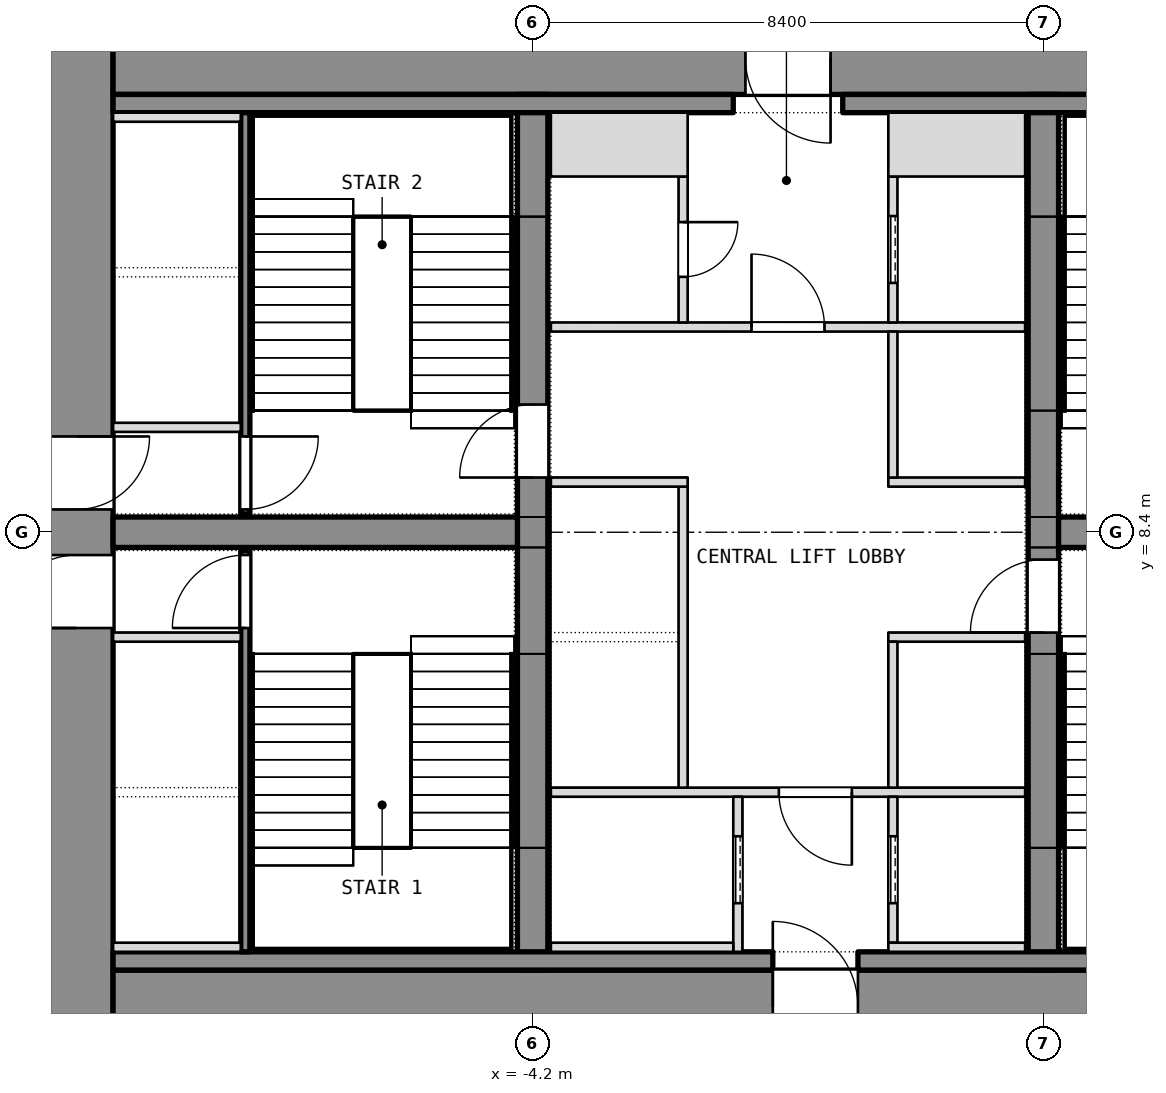
"""IFC4 building model, lengths in metres.
Left out: names, types, materials, properties, quantities, classifications, styles, units other than length and angle.
Written with IfcOpenShell. Run it as: python <this file> out.ifc"""

import sys

from ifc_helpers import new_model, si_unit, direction, frame, frame_2d, origin, place, context, subcontext, project, spatial, rectangle, extrude, element, fill, save


model = new_model("IFC4")
c1 = context("Model", 3, precision=1e-05, world=origin(), true_north=direction((0.0, 1.0)))
c2 = subcontext(c1, "Body", "Model", "MODEL_VIEW")
j1 = project(units=[si_unit("LENGTHUNIT", "METRE"), si_unit("PLANEANGLEUNIT", "RADIAN")], contexts=[c1])
p1 = place(None, origin())
s1 = spatial("IfcSite", under=j1, at=p1, CompositionType="ELEMENT")
p2 = place(p1, origin())
s2 = spatial("IfcBuilding", under=s1, at=p2, CompositionType="ELEMENT")
p3 = place(p2, frame((0.0, 0.0, 86.9)))
s3 = spatial("IfcBuildingStorey", under=s2, at=p3, CompositionType="ELEMENT", Elevation=86.9)
p4 = place(p3, frame((-11.7, 0.0, 0.0), z_axis=(0.0, 0.0, 1.0), x_axis=(0.0, 1.0, 0.0)))
e1 = element("IfcWall", 1, at=p4, inside=s3, PredefinedType="SHEAR", context=c2, shape_type="SweptSolid", body=[
    extrude(rectangle(XDim=16.8, YDim=1.2, at=frame_2d((8.4, 0.0))), origin(), (0.0, 0.0, 1.0), 10.8),
])
p5 = place(p4, frame((6.825, 0.0, 0.0)))
e2 = element("IfcOpeningElement", 2, at=p5, cuts=e1, PredefinedType="OPENING", context=c2, shape_type="SweptSolid", body=[
    extrude(rectangle(XDim=1.2, YDim=2.1, at=frame_2d((0.6, 1.05))), frame((0.0, 0.6, 0.0), z_axis=(0.0, -1.0, 0.0), x_axis=(1.0, 0.0, 0.0)), (0.0, 0.0, 1.0), 1.2),
])
p6 = place(p4, frame((8.775, 0.0, 0.0)))
e3 = element("IfcOpeningElement", 3, at=p6, cuts=e1, PredefinedType="OPENING", context=c2, shape_type="SweptSolid", body=[
    extrude(rectangle(XDim=1.2, YDim=2.1, at=frame_2d((0.6, 1.05))), frame((0.0, 0.6, 0.0), z_axis=(0.0, -1.0, 0.0), x_axis=(1.0, 0.0, 0.0)), (0.0, 0.0, 1.0), 1.2),
])
p7 = place(p3, frame((-11.1, 0.6, 0.0), z_axis=(0.0, 0.0, 1.0), x_axis=(1.0, 0.0, 0.0)))
e4 = element("IfcWall", 4, at=p7, inside=s3, PredefinedType="SHEAR", context=c2, shape_type="SweptSolid", body=[
    extrude(rectangle(XDim=22.2, YDim=1.2, at=frame_2d((11.1, 0.0))), origin(), (0.0, 0.0, 1.0), 10.8),
])
p8 = place(p7, frame((10.85, 0.0, 0.0)))
e5 = element("IfcOpeningElement", 5, at=p8, cuts=e4, PredefinedType="OPENING", context=c2, shape_type="SweptSolid", body=[
    extrude(rectangle(XDim=1.4, YDim=2.1, at=frame_2d((0.7, 1.05))), frame((0.0, 0.6, 0.0), z_axis=(0.0, -1.0, 0.0), x_axis=(1.0, 0.0, 0.0)), (0.0, 0.0, 1.0), 1.2),
])
p9 = place(p3, frame((-11.1, 16.2, 0.0), z_axis=(0.0, 0.0, 1.0), x_axis=(1.0, 0.0, 0.0)))
e6 = element("IfcWall", 6, at=p9, inside=s3, PredefinedType="SHEAR", context=c2, shape_type="SweptSolid", body=[
    extrude(rectangle(XDim=22.2, YDim=1.2, at=frame_2d((11.1, 0.0))), origin(), (0.0, 0.0, 1.0), 10.8),
])
p10 = place(p9, frame((10.4, 0.0, 0.0)))
e7 = element("IfcOpeningElement", 7, at=p10, cuts=e6, PredefinedType="OPENING", context=c2, shape_type="SweptSolid", body=[
    extrude(rectangle(XDim=1.4, YDim=2.1, at=frame_2d((0.7, 1.05))), frame((0.0, 0.6, 0.0), z_axis=(0.0, -1.0, 0.0), x_axis=(1.0, 0.0, 0.0)), (0.0, 0.0, 1.0), 1.2),
])
p11 = place(p3, frame((-4.2, 1.2, 0.0), z_axis=(0.0, 0.0, 1.0), x_axis=(0.0, 1.0, 0.0)))
e8 = element("IfcWall", 8, at=p11, inside=s3, PredefinedType="SHEAR", context=c2, shape_type="SweptSolid", body=[
    extrude(rectangle(XDim=14.4, YDim=0.5, at=frame_2d((7.2, 0.0))), origin(), (0.0, 0.0, 1.0), 10.8),
])
p12 = place(p11, frame((8.1, 0.0, 0.0)))
e9 = element("IfcOpeningElement", 9, at=p12, cuts=e8, PredefinedType="OPENING", context=c2, shape_type="SweptSolid", body=[
    extrude(rectangle(XDim=1.2, YDim=2.1, at=frame_2d((0.6, 1.05))), frame((0.0, 0.25, 0.0), z_axis=(0.0, -1.0, 0.0), x_axis=(1.0, 0.0, 0.0)), (0.0, 0.0, 1.0), 0.5),
])
p13 = place(p3, frame((4.2, 1.2, 0.0), z_axis=(0.0, 0.0, 1.0), x_axis=(0.0, 1.0, 0.0)))
e10 = element("IfcWall", 10, at=p13, inside=s3, PredefinedType="SHEAR", context=c2, shape_type="SweptSolid", body=[
    extrude(rectangle(XDim=14.4, YDim=0.5, at=frame_2d((7.2, 0.0))), origin(), (0.0, 0.0, 1.0), 10.8),
])
p14 = place(p13, frame((5.55, 0.0, 0.0)))
e11 = element("IfcOpeningElement", 11, at=p14, cuts=e10, PredefinedType="OPENING", context=c2, shape_type="SweptSolid", body=[
    extrude(rectangle(XDim=1.2, YDim=2.1, at=frame_2d((0.6, 1.05))), frame((0.0, 0.25, 0.0), z_axis=(0.0, -1.0, 0.0), x_axis=(1.0, 0.0, 0.0)), (0.0, 0.0, 1.0), 0.5),
])
for number, where, z_axis, x_axis in (
    (12, (-11.1, 8.4, 0.0), (0.0, 0.0, 1.0), (1.0, 0.0, 0.0)),
    (13, (4.45, 8.4, 0.0), (0.0, 0.0, 1.0), (1.0, 0.0, 0.0)),
):
    element("IfcWall", number, at=place(p3, frame(where, z_axis=z_axis, x_axis=x_axis)), inside=s3, PredefinedType="SHEAR", context=c2, shape_type="SweptSolid", body=[
        extrude(rectangle(XDim=6.65, YDim=0.5, at=frame_2d((3.325, 0.0))), origin(), (0.0, 0.0, 1.0), 10.8),
    ])
p15 = place(p3, frame((-11.1, 1.35, 0.0), z_axis=(0.0, 0.0, 1.0), x_axis=(1.0, 0.0, 0.0)))
e14 = element("IfcWall", 14, at=p15, inside=s3, PredefinedType="PARTITIONING", context=c2, shape_type="SweptSolid", body=[
    extrude(rectangle(XDim=10.85, YDim=0.3, at=frame_2d((5.425, 0.0))), origin(), (0.0, 0.0, 1.0), 10.54),
])
p16 = place(p3, frame((1.15, 1.35, 0.0), z_axis=(0.0, 0.0, 1.0), x_axis=(1.0, 0.0, 0.0)))
e15 = element("IfcWall", 15, at=p16, inside=s3, PredefinedType="PARTITIONING", context=c2, shape_type="SweptSolid", body=[
    extrude(rectangle(XDim=9.95, YDim=0.3, at=frame_2d((4.975, 0.0))), origin(), (0.0, 0.0, 1.0), 10.54),
])
for number, where, z_axis, x_axis in (
    (16, (-11.1, 15.45, 0.0), (0.0, 0.0, 1.0), (1.0, 0.0, 0.0)),
    (17, (0.9, 15.45, 0.0), (0.0, 0.0, 1.0), (1.0, 0.0, 0.0)),
):
    element("IfcWall", number, at=place(p3, frame(where, z_axis=z_axis, x_axis=x_axis)), inside=s3, PredefinedType="PARTITIONING", context=c2, shape_type="SweptSolid", body=[
        extrude(rectangle(XDim=10.2, YDim=0.3, at=frame_2d((5.1, 0.0))), origin(), (0.0, 0.0, 1.0), 10.54),
    ])
p17 = place(p3, frame((-8.925, 1.5, 0.0), z_axis=(0.0, 0.0, 1.0), x_axis=(0.0, 1.0, 0.0)))
e18 = element("IfcWall", 18, at=p17, inside=s3, PredefinedType="SHEAR", context=c2, shape_type="SweptSolid", body=[
    extrude(rectangle(XDim=6.6, YDim=0.15, at=frame_2d((3.3, 0.0))), origin(), (0.0, 0.0, 1.0), 10.54),
])
p18 = place(p17, frame((5.325, 0.0, 0.0)))
e19 = element("IfcOpeningElement", 19, at=p18, cuts=e18, PredefinedType="OPENING", context=c2, shape_type="SweptSolid", body=[
    extrude(rectangle(XDim=1.2, YDim=2.1, at=frame_2d((0.6, 1.05))), frame((0.0, 0.075, 0.0), z_axis=(0.0, -1.0, 0.0), x_axis=(1.0, 0.0, 0.0)), (0.0, 0.0, 1.0), 0.15),
])
for number, where, z_axis, x_axis in (
    (20, (-11.1, 6.675, 0.0), (0.0, 0.0, 1.0), (1.0, 0.0, 0.0)),
    (21, (-11.1, 1.575, 0.0), (0.0, 0.0, 1.0), (1.0, 0.0, 0.0)),
):
    element("IfcWall", number, at=place(p3, frame(where, z_axis=z_axis, x_axis=x_axis)), inside=s3, PredefinedType="SHEAR", context=c2, shape_type="SweptSolid", body=[
        extrude(rectangle(XDim=2.1, YDim=0.15, at=frame_2d((1.05, 0.0))), origin(), (0.0, 0.0, 1.0), 10.8),
    ])
p19 = place(p3, frame((-8.925, 8.7, 0.0), z_axis=(0.0, 0.0, 1.0), x_axis=(0.0, 1.0, 0.0)))
e22 = element("IfcWall", 22, at=p19, inside=s3, PredefinedType="SHEAR", context=c2, shape_type="SweptSolid", body=[
    extrude(rectangle(XDim=6.6, YDim=0.15, at=frame_2d((3.3, 0.0))), origin(), (0.0, 0.0, 1.0), 10.54),
])
p20 = place(p19, frame((0.075, 0.0, 0.0)))
e23 = element("IfcOpeningElement", 23, at=p20, cuts=e22, PredefinedType="OPENING", context=c2, shape_type="SweptSolid", body=[
    extrude(rectangle(XDim=1.2, YDim=2.1, at=frame_2d((0.6, 1.05))), frame((0.0, 0.075, 0.0), z_axis=(0.0, -1.0, 0.0), x_axis=(1.0, 0.0, 0.0)), (0.0, 0.0, 1.0), 0.15),
])
for number, where, z_axis, x_axis in (
    (24, (-11.1, 10.125, 0.0), (0.0, 0.0, 1.0), (1.0, 0.0, 0.0)),
    (25, (-11.1, 15.225, 0.0), (0.0, 0.0, 1.0), (1.0, 0.0, 0.0)),
):
    element("IfcWall", number, at=place(p3, frame(where, z_axis=z_axis, x_axis=x_axis)), inside=s3, PredefinedType="SHEAR", context=c2, shape_type="SweptSolid", body=[
        extrude(rectangle(XDim=2.1, YDim=0.15, at=frame_2d((1.05, 0.0))), origin(), (0.0, 0.0, 1.0), 10.8),
    ])
p21 = place(p3, frame((-3.9, 4.125, 0.0), z_axis=(0.0, 0.0, 1.0), x_axis=(1.0, 0.0, 0.0)))
e26 = element("IfcWall", 26, at=p21, inside=s3, PredefinedType="PARTITIONING", context=c2, shape_type="SweptSolid", body=[
    extrude(rectangle(XDim=7.8, YDim=0.15, at=frame_2d((3.9, 0.0))), origin(), (0.0, 0.0, 1.0), 10.54),
])
p22 = place(p21, frame((3.75, 0.0, 0.0)))
e27 = element("IfcOpeningElement", 27, at=p22, cuts=e26, PredefinedType="OPENING", context=c2, shape_type="SweptSolid", body=[
    extrude(rectangle(XDim=1.2, YDim=2.1, at=frame_2d((0.6, 1.05))), frame((0.0, 0.075, 0.0), z_axis=(0.0, -1.0, 0.0), x_axis=(1.0, 0.0, 0.0)), (0.0, 0.0, 1.0), 0.15),
])
p23 = place(p3, frame((-3.9, 11.775, 0.0), z_axis=(0.0, 0.0, 1.0), x_axis=(1.0, 0.0, 0.0)))
e28 = element("IfcWall", 28, at=p23, inside=s3, PredefinedType="PARTITIONING", context=c2, shape_type="SweptSolid", body=[
    extrude(rectangle(XDim=7.8, YDim=0.15, at=frame_2d((3.9, 0.0))), origin(), (0.0, 0.0, 1.0), 10.54),
])
p24 = place(p23, frame((3.3, 0.0, 0.0)))
e29 = element("IfcOpeningElement", 29, at=p24, cuts=e28, PredefinedType="OPENING", context=c2, shape_type="SweptSolid", body=[
    extrude(rectangle(XDim=1.2, YDim=2.1, at=frame_2d((0.6, 1.05))), frame((0.0, 0.075, 0.0), z_axis=(0.0, -1.0, 0.0), x_axis=(1.0, 0.0, 0.0)), (0.0, 0.0, 1.0), 0.15),
])
p25 = place(p3, frame((-0.825, 1.5, 0.0), z_axis=(0.0, 0.0, 1.0), x_axis=(0.0, 1.0, 0.0)))
e30 = element("IfcWall", 30, at=p25, inside=s3, PredefinedType="SHEAR", context=c2, shape_type="SweptSolid", body=[
    extrude(rectangle(XDim=2.55, YDim=0.15, at=frame_2d((1.275, 0.0))), origin(), (0.0, 0.0, 1.0), 10.8),
])
p26 = place(p25, frame((0.8, 0.0, 0.0)))
e31 = element("IfcOpeningElement", 31, at=p26, cuts=e30, PredefinedType="OPENING", context=c2, shape_type="SweptSolid", body=[
    extrude(rectangle(XDim=1.1, YDim=2.1, at=frame_2d((0.55, 1.05))), frame((0.0, 0.075, 0.0), z_axis=(0.0, -1.0, 0.0), x_axis=(1.0, 0.0, 0.0)), (0.0, 0.0, 1.0), 0.15),
])
p27 = place(p3, frame((-3.9, 1.575, 0.0), z_axis=(0.0, 0.0, 1.0), x_axis=(1.0, 0.0, 0.0)))
e32 = element("IfcWall", 32, at=p27, inside=s3, PredefinedType="SHEAR", context=c2, shape_type="SweptSolid", body=[
    extrude(rectangle(XDim=3.0, YDim=0.15, at=frame_2d((1.5, 0.0))), origin(), (0.0, 0.0, 1.0), 10.8),
])
p28 = place(p3, frame((-1.725, 4.2, 0.0), z_axis=(0.0, 0.0, 1.0), x_axis=(0.0, 1.0, 0.0)))
e33 = element("IfcWall", 33, at=p28, inside=s3, PredefinedType="SHEAR", context=c2, shape_type="SweptSolid", body=[
    extrude(rectangle(XDim=4.95, YDim=0.15, at=frame_2d((2.475, 0.0))), origin(), (0.0, 0.0, 1.0), 10.8),
])
p29 = place(p3, frame((-3.9, 9.225, 0.0), z_axis=(0.0, 0.0, 1.0), x_axis=(1.0, 0.0, 0.0)))
e34 = element("IfcWall", 34, at=p29, inside=s3, PredefinedType="SHEAR", context=c2, shape_type="SweptSolid", body=[
    extrude(rectangle(XDim=2.25, YDim=0.15, at=frame_2d((1.125, 0.0))), origin(), (0.0, 0.0, 1.0), 10.8),
])
p30 = place(p3, frame((-1.725, 11.85, 0.0), z_axis=(0.0, 0.0, 1.0), x_axis=(0.0, 1.0, 0.0)))
e35 = element("IfcWall", 35, at=p30, inside=s3, PredefinedType="PARTITIONING", context=c2, shape_type="SweptSolid", body=[
    extrude(rectangle(XDim=2.4, YDim=0.15, at=frame_2d((1.2, 0.0))), origin(), (0.0, 0.0, 1.0), 10.54),
])
p31 = place(p30, frame((0.75, 0.0, 0.0)))
e36 = element("IfcOpeningElement", 36, at=p31, cuts=e35, PredefinedType="OPENING", context=c2, shape_type="SweptSolid", body=[
    extrude(rectangle(XDim=0.9, YDim=2.1, at=frame_2d((0.45, 1.05))), frame((0.0, 0.075, 0.0), z_axis=(0.0, -1.0, 0.0), x_axis=(1.0, 0.0, 0.0)), (0.0, 0.0, 1.0), 0.15),
])
p32 = place(p3, frame((-3.9, 14.775, 0.0), z_axis=(0.0, 0.0, 1.0), x_axis=(1.0, 0.0, 0.0)))
e37 = element("IfcWall", 37, at=p32, inside=s3, PredefinedType="PARTITIONING", context=c2, shape_type="SweptSolid", body=[
    extrude(rectangle(XDim=2.25, YDim=1.05, at=frame_2d((1.125, 0.0))), origin(), (0.0, 0.0, 1.0), 10.54),
])
p33 = place(p3, frame((1.725, 1.65, 0.0), z_axis=(0.0, 0.0, 1.0), x_axis=(0.0, 1.0, 0.0)))
e38 = element("IfcWall", 38, at=p33, inside=s3, PredefinedType="SHEAR", context=c2, shape_type="SweptSolid", body=[
    extrude(rectangle(XDim=2.4, YDim=0.15, at=frame_2d((1.2, 0.0))), origin(), (0.0, 0.0, 1.0), 10.8),
])
p34 = place(p33, frame((0.65, 0.0, 0.0)))
e39 = element("IfcOpeningElement", 39, at=p34, cuts=e38, PredefinedType="OPENING", context=c2, shape_type="SweptSolid", body=[
    extrude(rectangle(XDim=1.1, YDim=2.1, at=frame_2d((0.55, 1.05))), frame((0.0, 0.075, 0.0), z_axis=(0.0, -1.0, 0.0), x_axis=(1.0, 0.0, 0.0)), (0.0, 0.0, 1.0), 0.15),
])
p35 = place(p3, frame((1.65, 1.575, 0.0), z_axis=(0.0, 0.0, 1.0), x_axis=(1.0, 0.0, 0.0)))
e40 = element("IfcWall", 40, at=p35, inside=s3, PredefinedType="SHEAR", context=c2, shape_type="SweptSolid", body=[
    extrude(rectangle(XDim=2.25, YDim=0.15, at=frame_2d((1.125, 0.0))), origin(), (0.0, 0.0, 1.0), 10.8),
])
p36 = place(p3, frame((1.725, 11.85, 0.0), z_axis=(0.0, 0.0, 1.0), x_axis=(0.0, 1.0, 0.0)))
e41 = element("IfcWall", 41, at=p36, inside=s3, PredefinedType="SHEAR", context=c2, shape_type="SweptSolid", body=[
    extrude(rectangle(XDim=2.4, YDim=0.15, at=frame_2d((1.2, 0.0))), origin(), (0.0, 0.0, 1.0), 10.8),
])
p37 = place(p36, frame((0.65, 0.0, 0.0)))
e42 = element("IfcOpeningElement", 42, at=p37, cuts=e41, PredefinedType="OPENING", context=c2, shape_type="SweptSolid", body=[
    extrude(rectangle(XDim=1.1, YDim=2.1, at=frame_2d((0.55, 1.05))), frame((0.0, 0.075, 0.0), z_axis=(0.0, -1.0, 0.0), x_axis=(1.0, 0.0, 0.0)), (0.0, 0.0, 1.0), 0.15),
])
p38 = place(p3, frame((1.65, 14.775, 0.0), z_axis=(0.0, 0.0, 1.0), x_axis=(1.0, 0.0, 0.0)))
e43 = element("IfcWall", 43, at=p38, inside=s3, PredefinedType="SHEAR", context=c2, shape_type="SweptSolid", body=[
    extrude(rectangle(XDim=2.25, YDim=1.05, at=frame_2d((1.125, 0.0))), origin(), (0.0, 0.0, 1.0), 10.8),
])
for number, where, z_axis, x_axis in (
    (44, (1.65, 6.675, 0.0), (0.0, 0.0, 1.0), (1.0, 0.0, 0.0)),
    (45, (1.65, 9.225, 0.0), (0.0, 0.0, 1.0), (1.0, 0.0, 0.0)),
):
    element("IfcWall", number, at=place(p3, frame(where, z_axis=z_axis, x_axis=x_axis)), inside=s3, PredefinedType="SHEAR", context=c2, shape_type="SweptSolid", body=[
        extrude(rectangle(XDim=2.25, YDim=0.15, at=frame_2d((1.125, 0.0))), origin(), (0.0, 0.0, 1.0), 10.8),
    ])
p39 = place(p3, frame((1.725, 4.2, 0.0), z_axis=(0.0, 0.0, 1.0), x_axis=(0.0, 1.0, 0.0)))
e46 = element("IfcWall", 46, at=p39, inside=s3, PredefinedType="SHEAR", context=c2, shape_type="SweptSolid", body=[
    extrude(rectangle(XDim=2.4, YDim=0.15, at=frame_2d((1.2, 0.0))), origin(), (0.0, 0.0, 1.0), 10.8),
])
p40 = place(p3, frame((1.725, 9.3, 0.0), z_axis=(0.0, 0.0, 1.0), x_axis=(0.0, 1.0, 0.0)))
e47 = element("IfcWall", 47, at=p40, inside=s3, PredefinedType="SHEAR", context=c2, shape_type="SweptSolid", body=[
    extrude(rectangle(XDim=2.4, YDim=0.15, at=frame_2d((1.2, 0.0))), origin(), (0.0, 0.0, 1.0), 10.8),
])
p41 = place(p5, origin())
e48 = element("IfcDoor", 48, at=p41, inside=s3, OperationType="SINGLE_SWING_LEFT", PredefinedType="DOOR", context=c2, shape_type="SweptSolid", body=[
    extrude(rectangle(XDim=1.2, YDim=2.1, at=frame_2d((0.6, 1.05))), frame((0.0, 0.025, 0.0), z_axis=(0.0, -1.0, 0.0), x_axis=(1.0, 0.0, 0.0)), (0.0, 0.0, 1.0), 0.05),
])
fill(e2, e48)
p42 = place(p18, origin())
e49 = element("IfcDoor", 49, at=p42, inside=s3, OperationType="SINGLE_SWING_LEFT", PredefinedType="DOOR", context=c2, shape_type="SweptSolid", body=[
    extrude(rectangle(XDim=1.2, YDim=2.1, at=frame_2d((0.6, 1.05))), frame((0.0, 0.025, 0.0), z_axis=(0.0, -1.0, 0.0), x_axis=(1.0, 0.0, 0.0)), (0.0, 0.0, 1.0), 0.05),
])
fill(e19, e49)
p43 = place(p6, origin())
e50 = element("IfcDoor", 50, at=p43, inside=s3, OperationType="SINGLE_SWING_LEFT", PredefinedType="DOOR", context=c2, shape_type="SweptSolid", body=[
    extrude(rectangle(XDim=1.2, YDim=2.1, at=frame_2d((0.6, 1.05))), frame((0.0, 0.025, 0.0), z_axis=(0.0, -1.0, 0.0), x_axis=(1.0, 0.0, 0.0)), (0.0, 0.0, 1.0), 0.05),
])
fill(e3, e50)
p44 = place(p20, origin())
e51 = element("IfcDoor", 51, at=p44, inside=s3, OperationType="SINGLE_SWING_LEFT", PredefinedType="DOOR", context=c2, shape_type="SweptSolid", body=[
    extrude(rectangle(XDim=1.2, YDim=2.1, at=frame_2d((0.6, 1.05))), frame((0.0, 0.025, 0.0), z_axis=(0.0, -1.0, 0.0), x_axis=(1.0, 0.0, 0.0)), (0.0, 0.0, 1.0), 0.05),
])
fill(e23, e51)
p45 = place(p26, origin())
e52 = element("IfcDoor", 52, at=p45, inside=s3, OperationType="SLIDING_TO_LEFT", PredefinedType="DOOR", context=c2, shape_type="SweptSolid", body=[
    extrude(rectangle(XDim=1.1, YDim=2.1, at=frame_2d((0.55, 1.05))), frame((0.0, 0.025, 0.0), z_axis=(0.0, -1.0, 0.0), x_axis=(1.0, 0.0, 0.0)), (0.0, 0.0, 1.0), 0.05),
])
fill(e31, e52)
p46 = place(p34, origin())
e53 = element("IfcDoor", 53, at=p46, inside=s3, OperationType="SLIDING_TO_LEFT", PredefinedType="DOOR", context=c2, shape_type="SweptSolid", body=[
    extrude(rectangle(XDim=1.1, YDim=2.1, at=frame_2d((0.55, 1.05))), frame((0.0, 0.025, 0.0), z_axis=(0.0, -1.0, 0.0), x_axis=(1.0, 0.0, 0.0)), (0.0, 0.0, 1.0), 0.05),
])
fill(e39, e53)
p47 = place(p37, origin())
e54 = element("IfcDoor", 54, at=p47, inside=s3, OperationType="SLIDING_TO_LEFT", PredefinedType="DOOR", context=c2, shape_type="SweptSolid", body=[
    extrude(rectangle(XDim=1.1, YDim=2.1, at=frame_2d((0.55, 1.05))), frame((0.0, 0.025, 0.0), z_axis=(0.0, -1.0, 0.0), x_axis=(1.0, 0.0, 0.0)), (0.0, 0.0, 1.0), 0.05),
])
fill(e42, e54)
p48 = place(p22, origin())
e55 = element("IfcDoor", 55, at=p48, inside=s3, OperationType="SINGLE_SWING_LEFT", PredefinedType="DOOR", context=c2, shape_type="SweptSolid", body=[
    extrude(rectangle(XDim=1.2, YDim=2.1, at=frame_2d((0.6, 1.05))), frame((0.0, 0.025, 0.0), z_axis=(0.0, -1.0, 0.0), x_axis=(1.0, 0.0, 0.0)), (0.0, 0.0, 1.0), 0.05),
])
fill(e27, e55)
p49 = place(p24, origin())
e56 = element("IfcDoor", 56, at=p49, inside=s3, OperationType="SINGLE_SWING_LEFT", PredefinedType="DOOR", context=c2, shape_type="SweptSolid", body=[
    extrude(rectangle(XDim=1.2, YDim=2.1, at=frame_2d((0.6, 1.05))), frame((0.0, 0.025, 0.0), z_axis=(0.0, -1.0, 0.0), x_axis=(1.0, 0.0, 0.0)), (0.0, 0.0, 1.0), 0.05),
])
fill(e29, e56)
p50 = place(p31, origin())
e57 = element("IfcDoor", 57, at=p50, inside=s3, OperationType="SINGLE_SWING_LEFT", PredefinedType="DOOR", context=c2, shape_type="SweptSolid", body=[
    extrude(rectangle(XDim=0.9, YDim=2.1, at=frame_2d((0.45, 1.05))), frame((0.0, 0.025, 0.0), z_axis=(0.0, -1.0, 0.0), x_axis=(1.0, 0.0, 0.0)), (0.0, 0.0, 1.0), 0.05),
])
fill(e36, e57)
p51 = place(p12, origin())
e58 = element("IfcDoor", 58, at=p51, inside=s3, OperationType="SINGLE_SWING_LEFT", PredefinedType="DOOR", context=c2, shape_type="SweptSolid", body=[
    extrude(rectangle(XDim=1.2, YDim=2.1, at=frame_2d((0.6, 1.05))), frame((0.0, 0.025, 0.0), z_axis=(0.0, -1.0, 0.0), x_axis=(1.0, 0.0, 0.0)), (0.0, 0.0, 1.0), 0.05),
])
fill(e9, e58)
p52 = place(p14, origin())
e59 = element("IfcDoor", 59, at=p52, inside=s3, OperationType="SINGLE_SWING_LEFT", PredefinedType="DOOR", context=c2, shape_type="SweptSolid", body=[
    extrude(rectangle(XDim=1.2, YDim=2.1, at=frame_2d((0.6, 1.05))), frame((0.0, 0.025, 0.0), z_axis=(0.0, -1.0, 0.0), x_axis=(1.0, 0.0, 0.0)), (0.0, 0.0, 1.0), 0.05),
])
fill(e11, e59)
p53 = place(p10, origin())
e60 = element("IfcDoor", 60, at=p53, inside=s3, OperationType="SINGLE_SWING_LEFT", PredefinedType="DOOR", context=c2, shape_type="SweptSolid", body=[
    extrude(rectangle(XDim=1.4, YDim=2.1, at=frame_2d((0.7, 1.05))), frame((0.0, 0.025, 0.0), z_axis=(0.0, -1.0, 0.0), x_axis=(1.0, 0.0, 0.0)), (0.0, 0.0, 1.0), 0.05),
])
fill(e7, e60)
p54 = place(p8, origin())
e61 = element("IfcDoor", 61, at=p54, inside=s3, OperationType="SINGLE_SWING_LEFT", PredefinedType="DOOR", context=c2, shape_type="SweptSolid", body=[
    extrude(rectangle(XDim=1.4, YDim=2.1, at=frame_2d((0.7, 1.05))), frame((0.0, 0.025, 0.0), z_axis=(0.0, -1.0, 0.0), x_axis=(1.0, 0.0, 0.0)), (0.0, 0.0, 1.0), 0.05),
])
fill(e5, e61)
save(model, sys.argv[1])
